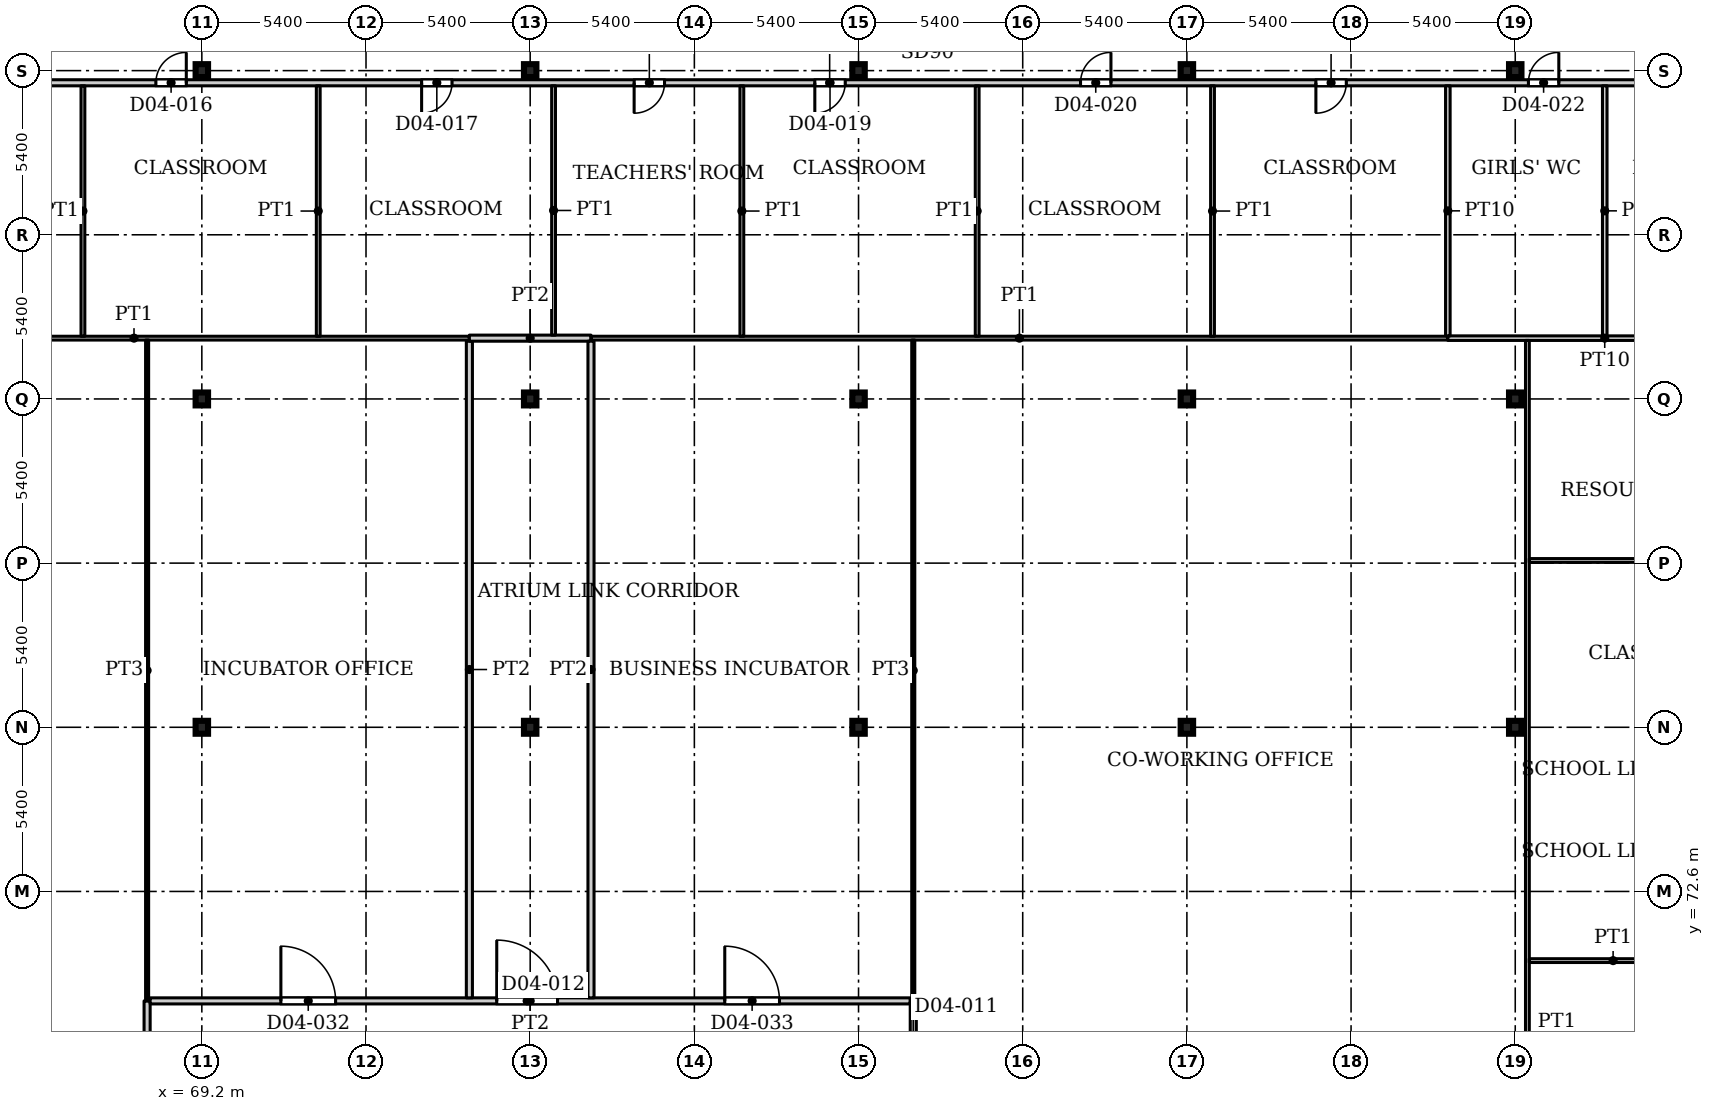
"""IFC4 building model, lengths in metres.
Left out: names, types, materials, properties, quantities, classifications, styles, units other than length and angle.
Written with IfcOpenShell. Run it as: python <this file> out.ifc"""

import sys

from ifc_helpers import new_model, si_unit, direction, frame, frame_2d, origin, origin_2d, place, context, subcontext, project, spatial, rectangle, i_section, extrude, source, transform, mapped, element, fill, save


model = new_model("IFC4")
c1 = context("Model", 3, precision=1e-05, world=origin(), true_north=direction((0.0, 1.0)))
c2 = subcontext(c1, "Body", "Model", "MODEL_VIEW")
j1 = project(units=[si_unit("LENGTHUNIT", "METRE"), si_unit("PLANEANGLEUNIT", "RADIAN")], contexts=[c1])
p1 = place(None, origin())
s1 = spatial("IfcSite", under=j1, at=p1, CompositionType="ELEMENT")
p2 = place(p1, origin())
s2 = spatial("IfcBuilding", under=s1, at=p2, CompositionType="ELEMENT")
p3 = place(p2, frame((0.0, 0.0, 21.5)))
s3 = spatial("IfcBuildingStorey", under=s2, at=p3, CompositionType="ELEMENT", Elevation=21.5)
for number, where, z_axis, x_axis in (
    (1, (69.2, 78.0, 0.0), (0.0, 0.0, 1.0), (1.0, 0.0, 0.0)),
    (2, (80.0, 78.0, 0.0), (0.0, 0.0, 1.0), (1.0, 0.0, 0.0)),
    (3, (90.8, 78.0, 0.0), (0.0, 0.0, 1.0), (1.0, 0.0, 0.0)),
    (4, (101.6, 78.0, 0.0), (0.0, 0.0, 1.0), (1.0, 0.0, 0.0)),
    (5, (112.4, 78.0, 0.0), (0.0, 0.0, 1.0), (1.0, 0.0, 0.0)),
    (6, (69.2, 88.8, 0.0), (0.0, 0.0, 1.0), (1.0, 0.0, 0.0)),
    (7, (80.0, 88.8, 0.0), (0.0, 0.0, 1.0), (1.0, 0.0, 0.0)),
    (8, (90.8, 88.8, 0.0), (0.0, 0.0, 1.0), (1.0, 0.0, 0.0)),
    (9, (101.6, 88.8, 0.0), (0.0, 0.0, 1.0), (1.0, 0.0, 0.0)),
    (10, (112.4, 88.8, 0.0), (0.0, 0.0, 1.0), (1.0, 0.0, 0.0)),
    (11, (69.2, 99.6, 0.0), (0.0, 0.0, 1.0), (1.0, 0.0, 0.0)),
    (12, (80.0, 99.6, 0.0), (0.0, 0.0, 1.0), (1.0, 0.0, 0.0)),
    (13, (90.8, 99.6, 0.0), (0.0, 0.0, 1.0), (1.0, 0.0, 0.0)),
    (14, (101.6, 99.6, 0.0), (0.0, 0.0, 1.0), (1.0, 0.0, 0.0)),
    (15, (112.4, 99.6, 0.0), (0.0, 0.0, 1.0), (1.0, 0.0, 0.0)),
):
    element("IfcColumn", number, at=place(p3, frame(where, z_axis=z_axis, x_axis=x_axis)), inside=s3, PredefinedType="COLUMN", context=c2, shape_type="SweptSolid", body=[
        extrude(i_section(OverallWidth=0.409, OverallDepth=0.425, WebThickness=0.033, FlangeThickness=0.052, FilletRadius=0.013, at=origin_2d()), origin(), (0.0, 0.0, 1.0), 4.5),
    ])
p4 = place(p3, frame((55.938, 90.8, 0.0), z_axis=(0.0, 0.0, 1.0), x_axis=(1.0, 0.0, 0.0)))
e16 = element("IfcWall", 16, at=p4, inside=s3, PredefinedType="PARTITIONING", context=c2, shape_type="SweptSolid", body=[
    extrude(rectangle(XDim=22.062, YDim=0.125, at=frame_2d((11.031, 0.0))), origin(), (0.0, 0.0, 1.0), 4.18),
])
p5 = place(p3, frame((56.1, 99.2, 0.0), z_axis=(0.0, 0.0, 1.0), x_axis=(1.0, 0.0, 0.0)))
e17 = element("IfcWall", 17, at=p5, inside=s3, PredefinedType="PARTITIONING", context=c2, shape_type="SweptSolid", body=[
    extrude(rectangle(XDim=67.5, YDim=0.2, at=frame_2d((33.75, 0.0))), origin(), (0.0, 0.0, 1.0), 4.18),
])
p6 = place(p5, frame((4.05, 0.0, 0.0)))
e18 = element("IfcOpeningElement", 18, at=p6, cuts=e17, PredefinedType="OPENING", context=c2, shape_type="SweptSolid", body=[
    extrude(rectangle(XDim=1.0, YDim=2.1, at=frame_2d((0.5, 1.05))), frame((0.0, 0.11, 0.0), z_axis=(0.0, -1.0, 0.0), x_axis=(1.0, 0.0, 0.0)), (0.0, 0.0, 1.0), 0.22),
])
p7 = place(p5, frame((65.554, 0.0, 0.0)))
e19 = element("IfcOpeningElement", 19, at=p7, cuts=e17, PredefinedType="OPENING", context=c2, shape_type="SweptSolid", body=[
    extrude(rectangle(XDim=1.0, YDim=2.1, at=frame_2d((0.5, 1.05))), frame((0.0, 0.11, 0.0), z_axis=(0.0, -1.0, 0.0), x_axis=(1.0, 0.0, 0.0)), (0.0, 0.0, 1.0), 0.22),
])
p8 = place(p5, frame((11.589, 0.0, 0.0)))
e20 = element("IfcOpeningElement", 20, at=p8, cuts=e17, PredefinedType="OPENING", context=c2, shape_type="SweptSolid", body=[
    extrude(rectangle(XDim=1.0, YDim=2.1, at=frame_2d((0.5, 1.05))), frame((0.0, 0.11, 0.0), z_axis=(0.0, -1.0, 0.0), x_axis=(1.0, 0.0, 0.0)), (0.0, 0.0, 1.0), 0.22),
])
p9 = place(p5, frame((20.329, 0.0, 0.0)))
e21 = element("IfcOpeningElement", 21, at=p9, cuts=e17, PredefinedType="OPENING", context=c2, shape_type="SweptSolid", body=[
    extrude(rectangle(XDim=1.0, YDim=2.1, at=frame_2d((0.5, 1.05))), frame((0.0, 0.11, 0.0), z_axis=(0.0, -1.0, 0.0), x_axis=(1.0, 0.0, 0.0)), (0.0, 0.0, 1.0), 0.22),
])
p10 = place(p5, frame((27.319, 0.0, 0.0)))
e22 = element("IfcOpeningElement", 22, at=p10, cuts=e17, PredefinedType="OPENING", context=c2, shape_type="SweptSolid", body=[
    extrude(rectangle(XDim=1.0, YDim=2.1, at=frame_2d((0.5, 1.05))), frame((0.0, 0.11, 0.0), z_axis=(0.0, -1.0, 0.0), x_axis=(1.0, 0.0, 0.0)), (0.0, 0.0, 1.0), 0.22),
])
p11 = place(p5, frame((33.262, 0.0, 0.0)))
e23 = element("IfcOpeningElement", 23, at=p11, cuts=e17, PredefinedType="OPENING", context=c2, shape_type="SweptSolid", body=[
    extrude(rectangle(XDim=1.0, YDim=2.1, at=frame_2d((0.5, 1.05))), frame((0.0, 0.11, 0.0), z_axis=(0.0, -1.0, 0.0), x_axis=(1.0, 0.0, 0.0)), (0.0, 0.0, 1.0), 0.22),
])
p12 = place(p5, frame((42.002, 0.0, 0.0)))
e24 = element("IfcOpeningElement", 24, at=p12, cuts=e17, PredefinedType="OPENING", context=c2, shape_type="SweptSolid", body=[
    extrude(rectangle(XDim=1.0, YDim=2.1, at=frame_2d((0.5, 1.05))), frame((0.0, 0.11, 0.0), z_axis=(0.0, -1.0, 0.0), x_axis=(1.0, 0.0, 0.0)), (0.0, 0.0, 1.0), 0.22),
])
p13 = place(p5, frame((49.743, 0.0, 0.0)))
e25 = element("IfcOpeningElement", 25, at=p13, cuts=e17, PredefinedType="OPENING", context=c2, shape_type="SweptSolid", body=[
    extrude(rectangle(XDim=1.0, YDim=2.1, at=frame_2d((0.5, 1.05))), frame((0.0, 0.11, 0.0), z_axis=(0.0, -1.0, 0.0), x_axis=(1.0, 0.0, 0.0)), (0.0, 0.0, 1.0), 0.22),
])
p14 = place(p5, frame((56.733, 0.0, 0.0)))
e26 = element("IfcOpeningElement", 26, at=p14, cuts=e17, PredefinedType="OPENING", context=c2, shape_type="SweptSolid", body=[
    extrude(rectangle(XDim=1.0, YDim=2.1, at=frame_2d((0.5, 1.05))), frame((0.0, 0.11, 0.0), z_axis=(0.0, -1.0, 0.0), x_axis=(1.0, 0.0, 0.0)), (0.0, 0.0, 1.0), 0.22),
])
p15 = place(p5, frame((61.394, 0.0, 0.0)))
e27 = element("IfcOpeningElement", 27, at=p15, cuts=e17, PredefinedType="OPENING", context=c2, shape_type="SweptSolid", body=[
    extrude(rectangle(XDim=1.0, YDim=2.1, at=frame_2d((0.5, 1.05))), frame((0.0, 0.11, 0.0), z_axis=(0.0, -1.0, 0.0), x_axis=(1.0, 0.0, 0.0)), (0.0, 0.0, 1.0), 0.22),
])
p16 = place(p3, frame((65.289, 90.862, 0.0), z_axis=(0.0, 0.0, 1.0), x_axis=(0.0, 1.0, 0.0)))
e28 = element("IfcWall", 28, at=p16, inside=s3, PredefinedType="PARTITIONING", context=c2, shape_type="SweptSolid", body=[
    extrude(rectangle(XDim=8.238, YDim=0.125, at=frame_2d((4.119, 0.0))), origin(), (0.0, 0.0, 1.0), 4.18),
])
p17 = place(p3, frame((67.4, 43.8, 0.0), z_axis=(0.0, 0.0, 1.0), x_axis=(0.0, 1.0, 0.0)))
e29 = element("IfcWall", 29, at=p17, inside=s3, PredefinedType="PARTITIONING", context=c2, shape_type="SweptSolid", body=[
    extrude(rectangle(XDim=25.2, YDim=0.2, at=frame_2d((12.6, 0.0))), origin(), (0.0, 0.0, 1.0), 4.18),
])
p18 = place(p17, frame((7.25, 0.0, 0.0)))
e30 = element("IfcOpeningElement", 30, at=p18, cuts=e29, PredefinedType="OPENING", context=c2, shape_type="SweptSolid", body=[
    extrude(rectangle(XDim=1.8, YDim=2.1, at=frame_2d((0.9, 1.05))), frame((0.0, 0.11, 0.0), z_axis=(0.0, -1.0, 0.0), x_axis=(1.0, 0.0, 0.0)), (0.0, 0.0, 1.0), 0.22),
])
p19 = place(p17, frame((19.75, 0.0, 0.0)))
e31 = element("IfcOpeningElement", 31, at=p19, cuts=e29, PredefinedType="OPENING", context=c2, shape_type="SweptSolid", body=[
    extrude(rectangle(XDim=1.8, YDim=2.1, at=frame_2d((0.9, 1.05))), frame((0.0, 0.11, 0.0), z_axis=(0.0, -1.0, 0.0), x_axis=(1.0, 0.0, 0.0)), (0.0, 0.0, 1.0), 0.22),
])
p20 = place(p3, frame((67.4, 69.0, 0.0), z_axis=(0.0, 0.0, 1.0), x_axis=(0.0, 1.0, 0.0)))
e32 = element("IfcWall", 32, at=p20, inside=s3, PredefinedType="PARTITIONING", context=c2, shape_type="SweptSolid", body=[
    extrude(rectangle(XDim=21.738, YDim=0.1, at=frame_2d((10.869, 0.0))), origin(), (0.0, 0.0, 1.0), 4.18),
])
p21 = place(p3, frame((67.5, 69.0, 0.0), z_axis=(0.0, 0.0, 1.0), x_axis=(1.0, 0.0, 0.0)))
e33 = element("IfcWall", 33, at=p21, inside=s3, PredefinedType="PARTITIONING", context=c2, shape_type="SweptSolid", body=[
    extrude(rectangle(XDim=25.0, YDim=0.2, at=frame_2d((12.5, 0.0))), origin(), (0.0, 0.0, 1.0), 4.18),
])
p22 = place(p21, frame((11.4, 0.0, 0.0)))
e34 = element("IfcOpeningElement", 34, at=p22, cuts=e33, PredefinedType="OPENING", context=c2, shape_type="SweptSolid", body=[
    extrude(rectangle(XDim=2.0, YDim=2.1, at=frame_2d((1.0, 1.05))), frame((0.0, 0.11, 0.0), z_axis=(0.0, -1.0, 0.0), x_axis=(1.0, 0.0, 0.0)), (0.0, 0.0, 1.0), 0.22),
])
p23 = place(p21, frame((4.3, 0.0, 0.0)))
e35 = element("IfcOpeningElement", 35, at=p23, cuts=e33, PredefinedType="OPENING", context=c2, shape_type="SweptSolid", body=[
    extrude(rectangle(XDim=1.8, YDim=2.1, at=frame_2d((0.9, 1.05))), frame((0.0, 0.11, 0.0), z_axis=(0.0, -1.0, 0.0), x_axis=(1.0, 0.0, 0.0)), (0.0, 0.0, 1.0), 0.22),
])
p24 = place(p21, frame((18.9, 0.0, 0.0)))
e36 = element("IfcOpeningElement", 36, at=p24, cuts=e33, PredefinedType="OPENING", context=c2, shape_type="SweptSolid", body=[
    extrude(rectangle(XDim=1.8, YDim=2.1, at=frame_2d((0.9, 1.05))), frame((0.0, 0.11, 0.0), z_axis=(0.0, -1.0, 0.0), x_axis=(1.0, 0.0, 0.0)), (0.0, 0.0, 1.0), 0.22),
])
p25 = place(p3, frame((73.029, 90.862, 0.0), z_axis=(0.0, 0.0, 1.0), x_axis=(0.0, 1.0, 0.0)))
e37 = element("IfcWall", 37, at=p25, inside=s3, PredefinedType="PARTITIONING", context=c2, shape_type="SweptSolid", body=[
    extrude(rectangle(XDim=8.238, YDim=0.125, at=frame_2d((4.119, 0.0))), origin(), (0.0, 0.0, 1.0), 4.18),
])
p26 = place(p3, frame((78.0, 69.1, 0.0), z_axis=(0.0, 0.0, 1.0), x_axis=(0.0, 1.0, 0.0)))
e38 = element("IfcWall", 38, at=p26, inside=s3, PredefinedType="PARTITIONING", context=c2, shape_type="SweptSolid", body=[
    extrude(rectangle(XDim=21.6, YDim=0.2, at=frame_2d((10.8, 0.0))), origin(), (0.0, 0.0, 1.0), 4.18),
])
p27 = place(p3, frame((78.0, 90.8, 0.0), z_axis=(0.0, 0.0, 1.0), x_axis=(1.0, 0.0, 0.0)))
e39 = element("IfcWall", 39, at=p27, inside=s3, PredefinedType="PARTITIONING", context=c2, shape_type="SweptSolid", body=[
    extrude(rectangle(XDim=4.0, YDim=0.2, at=frame_2d((2.0, 0.0))), origin(), (0.0, 0.0, 1.0), 4.18),
])
p28 = place(p3, frame((80.769, 90.9, 0.0), z_axis=(0.0, 0.0, 1.0), x_axis=(0.0, 1.0, 0.0)))
e40 = element("IfcWall", 40, at=p28, inside=s3, PredefinedType="PARTITIONING", context=c2, shape_type="SweptSolid", body=[
    extrude(rectangle(XDim=8.2, YDim=0.125, at=frame_2d((4.1, 0.0))), origin(), (0.0, 0.0, 1.0), 4.18),
])
p29 = place(p3, frame((82.0, 69.1, 0.0), z_axis=(0.0, 0.0, 1.0), x_axis=(0.0, 1.0, 0.0)))
e41 = element("IfcWall", 41, at=p29, inside=s3, PredefinedType="PARTITIONING", context=c2, shape_type="SweptSolid", body=[
    extrude(rectangle(XDim=21.6, YDim=0.2, at=frame_2d((10.8, 0.0))), origin(), (0.0, 0.0, 1.0), 4.18),
])
p30 = place(p3, frame((82.0, 90.8, 0.0), z_axis=(0.0, 0.0, 1.0), x_axis=(1.0, 0.0, 0.0)))
e42 = element("IfcWall", 42, at=p30, inside=s3, PredefinedType="PARTITIONING", context=c2, shape_type="SweptSolid", body=[
    extrude(rectangle(XDim=28.183, YDim=0.125, at=frame_2d((14.092, 0.0))), origin(), (0.0, 0.0, 1.0), 4.18),
])
p31 = place(p3, frame((86.962, 90.862, 0.0), z_axis=(0.0, 0.0, 1.0), x_axis=(0.0, 1.0, 0.0)))
e43 = element("IfcWall", 43, at=p31, inside=s3, PredefinedType="PARTITIONING", context=c2, shape_type="SweptSolid", body=[
    extrude(rectangle(XDim=8.238, YDim=0.125, at=frame_2d((4.119, 0.0))), origin(), (0.0, 0.0, 1.0), 4.18),
])
p32 = place(p3, frame((92.6, 48.1, 0.0), z_axis=(0.0, 0.0, 1.0), x_axis=(0.0, 1.0, 0.0)))
e44 = element("IfcWall", 44, at=p32, inside=s3, PredefinedType="PARTITIONING", context=c2, shape_type="SweptSolid", body=[
    extrude(rectangle(XDim=20.9, YDim=0.2, at=frame_2d((10.45, 0.0))), origin(), (0.0, 0.0, 1.0), 4.18),
])
p33 = place(p32, frame((8.05, 0.0, 0.0)))
e45 = element("IfcOpeningElement", 45, at=p33, cuts=e44, PredefinedType="OPENING", context=c2, shape_type="SweptSolid", body=[
    extrude(rectangle(XDim=1.8, YDim=2.1, at=frame_2d((0.9, 1.05))), frame((0.0, 0.11, 0.0), z_axis=(0.0, -1.0, 0.0), x_axis=(1.0, 0.0, 0.0)), (0.0, 0.0, 1.0), 0.22),
])
p34 = place(p32, frame((18.8, 0.0, 0.0)))
e46 = element("IfcOpeningElement", 46, at=p34, cuts=e44, PredefinedType="OPENING", context=c2, shape_type="SweptSolid", body=[
    extrude(rectangle(XDim=1.0, YDim=2.1, at=frame_2d((0.5, 1.05))), frame((0.0, 0.11, 0.0), z_axis=(0.0, -1.0, 0.0), x_axis=(1.0, 0.0, 0.0)), (0.0, 0.0, 1.0), 0.22),
])
p35 = place(p3, frame((92.6, 69.0, 0.0), z_axis=(0.0, 0.0, 1.0), x_axis=(0.0, 1.0, 0.0)))
e47 = element("IfcWall", 47, at=p35, inside=s3, PredefinedType="PARTITIONING", context=c2, shape_type="SweptSolid", body=[
    extrude(rectangle(XDim=21.738, YDim=0.1, at=frame_2d((10.869, 0.0))), origin(), (0.0, 0.0, 1.0), 4.18),
])
for number, where, z_axis, x_axis in (
    (48, (94.702, 90.862, 0.0), (0.0, 0.0, 1.0), (0.0, 1.0, 0.0)),
    (49, (102.443, 90.862, 0.0), (0.0, 0.0, 1.0), (0.0, 1.0, 0.0)),
):
    element("IfcWall", number, at=place(p3, frame(where, z_axis=z_axis, x_axis=x_axis)), inside=s3, PredefinedType="PARTITIONING", context=c2, shape_type="SweptSolid", body=[
        extrude(rectangle(XDim=8.238, YDim=0.125, at=frame_2d((4.119, 0.0))), origin(), (0.0, 0.0, 1.0), 4.18),
    ])
p36 = place(p3, frame((110.183, 90.8, 0.0), z_axis=(0.0, 0.0, 1.0), x_axis=(1.0, 0.0, 0.0)))
e50 = element("IfcWall", 50, at=p36, inside=s3, PredefinedType="PARTITIONING", context=c2, shape_type="SweptSolid", body=[
    extrude(rectangle(XDim=10.321, YDim=0.15, at=frame_2d((5.16, 0.0))), origin(), (0.0, 0.0, 1.0), 4.18),
])
p37 = place(p3, frame((110.183, 90.875, 0.0), z_axis=(0.0, 0.0, 1.0), x_axis=(0.0, 1.0, 0.0)))
e51 = element("IfcWall", 51, at=p37, inside=s3, PredefinedType="PARTITIONING", context=c2, shape_type="SweptSolid", body=[
    extrude(rectangle(XDim=8.225, YDim=0.15, at=frame_2d((4.113, 0.0))), origin(), (0.0, 0.0, 1.0), 4.18),
])
p38 = place(p3, frame((112.8, 43.938, 0.0), z_axis=(0.0, 0.0, 1.0), x_axis=(0.0, 1.0, 0.0)))
e52 = element("IfcWall", 52, at=p38, inside=s3, PredefinedType="PARTITIONING", context=c2, shape_type="SweptSolid", body=[
    extrude(rectangle(XDim=46.787, YDim=0.125, at=frame_2d((23.394, 0.0))), origin(), (0.0, 0.0, 1.0), 4.18),
])
p39 = place(p3, frame((112.862, 70.325, 0.0), z_axis=(0.0, 0.0, 1.0), x_axis=(1.0, 0.0, 0.0)))
e53 = element("IfcWall", 53, at=p39, inside=s3, PredefinedType="PARTITIONING", context=c2, shape_type="SweptSolid", body=[
    extrude(rectangle(XDim=5.514, YDim=0.125, at=frame_2d((2.757, 0.0))), origin(), (0.0, 0.0, 1.0), 4.18),
])
p40 = place(p3, frame((112.862, 83.487, 0.0), z_axis=(0.0, 0.0, 1.0), x_axis=(1.0, 0.0, 0.0)))
e54 = element("IfcWall", 54, at=p40, inside=s3, PredefinedType="PARTITIONING", context=c2, shape_type="SweptSolid", body=[
    extrude(rectangle(XDim=8.238, YDim=0.125, at=frame_2d((4.119, 0.0))), origin(), (0.0, 0.0, 1.0), 4.18),
])
p41 = place(p3, frame((115.344, 90.875, 0.0), z_axis=(0.0, 0.0, 1.0), x_axis=(0.0, 1.0, 0.0)))
e55 = element("IfcWall", 55, at=p41, inside=s3, PredefinedType="PARTITIONING", context=c2, shape_type="SweptSolid", body=[
    extrude(rectangle(XDim=8.225, YDim=0.15, at=frame_2d((4.113, 0.0))), origin(), (0.0, 0.0, 1.0), 4.18),
])
m1 = source(origin(), c2, "Body", "SweptSolid", [
    extrude(rectangle(XDim=2.0, YDim=2.1, at=frame_2d((1.0, 1.05))), frame((0.0, 0.025, 0.0), z_axis=(0.0, -1.0, 0.0), x_axis=(1.0, 0.0, 0.0)), (0.0, 0.0, 1.0), 0.05),
])
p42 = place(p22, origin())
e56 = element("IfcDoor", 56, at=p42, inside=s3, OperationType="DOUBLE_DOOR_SINGLE_SWING", PredefinedType="DOOR", context=c2, shape_type="MappedRepresentation", body=[
    mapped(m1, transform((0.0, 0.0, 0.0), x_axis=(1.0, 0.0, 0.0), y_axis=(0.0, 1.0, 0.0), z_axis=(0.0, 0.0, 1.0), scale=1.0)),
])
fill(e34, e56)
m2 = source(origin(), c2, "Body", "SweptSolid", [
    extrude(rectangle(XDim=1.0, YDim=2.1, at=frame_2d((0.5, 1.05))), frame((0.0, 0.025, 0.0), z_axis=(0.0, -1.0, 0.0), x_axis=(1.0, 0.0, 0.0)), (0.0, 0.0, 1.0), 0.05),
])
p43 = place(p8, origin())
e57 = element("IfcDoor", 57, at=p43, inside=s3, OperationType="SINGLE_SWING_LEFT", PredefinedType="DOOR", context=c2, shape_type="MappedRepresentation", body=[
    mapped(m2, transform((0.0, 0.0, 0.0), x_axis=(1.0, 0.0, 0.0), y_axis=(0.0, 1.0, 0.0), z_axis=(0.0, 0.0, 1.0), scale=1.0)),
])
fill(e20, e57)
p44 = place(p9, origin())
e58 = element("IfcDoor", 58, at=p44, inside=s3, OperationType="SINGLE_SWING_RIGHT", PredefinedType="DOOR", context=c2, shape_type="MappedRepresentation", body=[
    mapped(m2, transform((0.0, 0.0, 0.0), x_axis=(1.0, 0.0, 0.0), y_axis=(0.0, 1.0, 0.0), z_axis=(0.0, 0.0, 1.0), scale=1.0)),
])
fill(e21, e58)
p45 = place(p10, origin())
e59 = element("IfcDoor", 59, at=p45, inside=s3, OperationType="SINGLE_SWING_RIGHT", PredefinedType="DOOR", context=c2, shape_type="MappedRepresentation", body=[
    mapped(m2, transform((0.0, 0.0, 0.0), x_axis=(1.0, 0.0, 0.0), y_axis=(0.0, 1.0, 0.0), z_axis=(0.0, 0.0, 1.0), scale=1.0)),
])
fill(e22, e59)
p46 = place(p11, origin())
e60 = element("IfcDoor", 60, at=p46, inside=s3, OperationType="SINGLE_SWING_RIGHT", PredefinedType="DOOR", context=c2, shape_type="MappedRepresentation", body=[
    mapped(m2, transform((0.0, 0.0, 0.0), x_axis=(1.0, 0.0, 0.0), y_axis=(0.0, 1.0, 0.0), z_axis=(0.0, 0.0, 1.0), scale=1.0)),
])
fill(e23, e60)
p47 = place(p12, origin())
e61 = element("IfcDoor", 61, at=p47, inside=s3, OperationType="SINGLE_SWING_LEFT", PredefinedType="DOOR", context=c2, shape_type="MappedRepresentation", body=[
    mapped(m2, transform((0.0, 0.0, 0.0), x_axis=(1.0, 0.0, 0.0), y_axis=(0.0, 1.0, 0.0), z_axis=(0.0, 0.0, 1.0), scale=1.0)),
])
fill(e24, e61)
p48 = place(p13, origin())
e62 = element("IfcDoor", 62, at=p48, inside=s3, OperationType="SINGLE_SWING_RIGHT", PredefinedType="DOOR", context=c2, shape_type="MappedRepresentation", body=[
    mapped(m2, transform((0.0, 0.0, 0.0), x_axis=(1.0, 0.0, 0.0), y_axis=(0.0, 1.0, 0.0), z_axis=(0.0, 0.0, 1.0), scale=1.0)),
])
fill(e25, e62)
p49 = place(p14, origin())
e63 = element("IfcDoor", 63, at=p49, inside=s3, OperationType="SINGLE_SWING_LEFT", PredefinedType="DOOR", context=c2, shape_type="MappedRepresentation", body=[
    mapped(m2, transform((0.0, 0.0, 0.0), x_axis=(1.0, 0.0, 0.0), y_axis=(0.0, 1.0, 0.0), z_axis=(0.0, 0.0, 1.0), scale=1.0)),
])
fill(e26, e63)
m3 = source(origin(), c2, "Body", "SweptSolid", [
    extrude(rectangle(XDim=1.8, YDim=2.1, at=frame_2d((0.9, 1.05))), frame((0.0, 0.025, 0.0), z_axis=(0.0, -1.0, 0.0), x_axis=(1.0, 0.0, 0.0)), (0.0, 0.0, 1.0), 0.05),
])
p50 = place(p23, origin())
e64 = element("IfcDoor", 64, at=p50, inside=s3, OperationType="DOUBLE_DOOR_SINGLE_SWING", PredefinedType="DOOR", context=c2, shape_type="MappedRepresentation", body=[
    mapped(m3, transform((0.0, 0.0, 0.0), x_axis=(1.0, 0.0, 0.0), y_axis=(0.0, 1.0, 0.0), z_axis=(0.0, 0.0, 1.0), scale=1.0)),
])
fill(e35, e64)
p51 = place(p24, origin())
e65 = element("IfcDoor", 65, at=p51, inside=s3, OperationType="DOUBLE_DOOR_SINGLE_SWING", PredefinedType="DOOR", context=c2, shape_type="MappedRepresentation", body=[
    mapped(m3, transform((0.0, 0.0, 0.0), x_axis=(1.0, 0.0, 0.0), y_axis=(0.0, 1.0, 0.0), z_axis=(0.0, 0.0, 1.0), scale=1.0)),
])
fill(e36, e65)
save(model, sys.argv[1])
